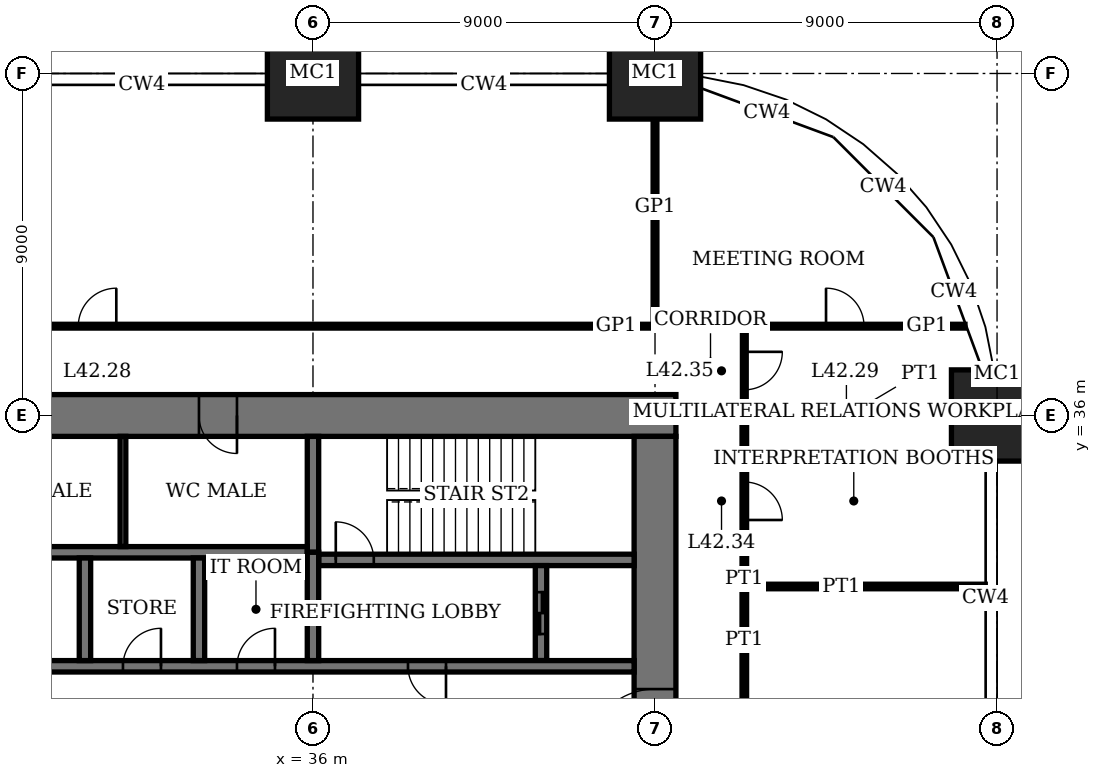
"""IFC4 building model, lengths in metres.
Left out: names, types, materials, properties, quantities, classifications, styles, units other than length and angle.
Written with IfcOpenShell. Run it as: python <this file> out.ifc"""

import sys

from ifc_helpers import new_model, si_unit, direction, frame, frame_2d, origin, origin_2d, place, context, subcontext, project, spatial, rectangle, extrude, element, fill, save


model = new_model("IFC4")
c1 = context("Model", 3, precision=1e-05, world=origin(), true_north=direction((0.0, 1.0)))
c2 = subcontext(c1, "Body", "Model", "MODEL_VIEW")
j1 = project(units=[si_unit("LENGTHUNIT", "METRE"), si_unit("PLANEANGLEUNIT", "RADIAN")], contexts=[c1])
p1 = place(None, origin())
s1 = spatial("IfcSite", under=j1, at=p1, CompositionType="ELEMENT")
p2 = place(p1, origin())
s2 = spatial("IfcBuilding", under=s1, at=p2, CompositionType="ELEMENT")
p3 = place(p2, frame((0.0, 0.0, 174.2)))
s3 = spatial("IfcBuildingStorey", under=s2, at=p3, CompositionType="ELEMENT", Elevation=174.2)
for number, where, z_axis, x_axis in (
    (1, (36.0, 45.0, 0.0), (0.0, 0.0, 1.0), (1.0, 0.0, 0.0)),
    (2, (45.0, 45.0, 0.0), (0.0, 0.0, 1.0), (1.0, 0.0, 0.0)),
    (3, (54.0, 36.0, 0.0), (0.0, 0.0, 1.0), (1.0, 0.0, 0.0)),
):
    element("IfcColumn", number, at=place(p3, frame(where, z_axis=z_axis, x_axis=x_axis)), inside=s3, PredefinedType="COLUMN", context=c2, shape_type="SweptSolid", body=[
        extrude(rectangle(XDim=2.4, YDim=2.4, at=origin_2d()), origin(), (0.0, 0.0, 1.0), 4.0),
    ])
p4 = place(p3, frame((45.55, 36.0, 0.0), z_axis=(0.0, 0.0, 1.0), x_axis=(-1.0, 0.0, 0.0)))
e4 = element("IfcWall", 4, at=p4, inside=s3, PredefinedType="SHEAR", context=c2, shape_type="SweptSolid", body=[
    extrude(rectangle(XDim=28.1, YDim=1.1, at=frame_2d((14.05, 0.0))), origin(), (0.0, 0.0, 1.0), 4.0),
])
p5 = place(p4, frame((11.55, 0.0, 0.0)))
e5 = element("IfcOpeningElement", 5, at=p5, cuts=e4, PredefinedType="OPENING", context=c2, shape_type="SweptSolid", body=[
    extrude(rectangle(XDim=1.0, YDim=2.4, at=frame_2d((0.5, 1.2))), frame((0.0, 0.56, 0.0), z_axis=(0.0, -1.0, 0.0), x_axis=(1.0, 0.0, 0.0)), (0.0, 0.0, 1.0), 1.12),
])
p6 = place(p4, frame((16.55, 0.0, 0.0)))
e6 = element("IfcOpeningElement", 6, at=p6, cuts=e4, PredefinedType="OPENING", context=c2, shape_type="SweptSolid", body=[
    extrude(rectangle(XDim=1.0, YDim=2.4, at=frame_2d((0.5, 1.2))), frame((0.0, 0.56, 0.0), z_axis=(0.0, -1.0, 0.0), x_axis=(1.0, 0.0, 0.0)), (0.0, 0.0, 1.0), 1.12),
])
p7 = place(p4, frame((20.0, 0.0, 0.0)))
e7 = element("IfcOpeningElement", 7, at=p7, cuts=e4, PredefinedType="OPENING", context=c2, shape_type="SweptSolid", body=[
    extrude(rectangle(XDim=1.1, YDim=2.4, at=frame_2d((0.55, 1.2))), frame((0.0, 0.56, 0.0), z_axis=(0.0, -1.0, 0.0), x_axis=(1.0, 0.0, 0.0)), (0.0, 0.0, 1.0), 1.12),
])
p8 = place(p4, frame((24.05, 0.0, 0.0)))
e8 = element("IfcOpeningElement", 8, at=p8, cuts=e4, PredefinedType="OPENING", context=c2, shape_type="SweptSolid", body=[
    extrude(rectangle(XDim=1.0, YDim=2.4, at=frame_2d((0.5, 1.2))), frame((0.0, 0.56, 0.0), z_axis=(0.0, -1.0, 0.0), x_axis=(1.0, 0.0, 0.0)), (0.0, 0.0, 1.0), 1.12),
])
p9 = place(p3, frame((45.0, 18.55, 0.0), z_axis=(0.0, 0.0, 1.0), x_axis=(0.0, 1.0, 0.0)))
e9 = element("IfcWall", 9, at=p9, inside=s3, PredefinedType="SHEAR", context=c2, shape_type="SweptSolid", body=[
    extrude(rectangle(XDim=16.9, YDim=1.1, at=frame_2d((8.45, 0.0))), origin(), (0.0, 0.0, 1.0), 4.0),
])
p10 = place(p9, frame((8.45, 0.0, 0.0)))
e10 = element("IfcOpeningElement", 10, at=p10, cuts=e9, PredefinedType="OPENING", context=c2, shape_type="SweptSolid", body=[
    extrude(rectangle(XDim=1.8, YDim=2.4, at=frame_2d((0.9, 1.2))), frame((0.0, 0.56, 0.0), z_axis=(0.0, -1.0, 0.0), x_axis=(1.0, 0.0, 0.0)), (0.0, 0.0, 1.0), 1.12),
])
p11 = place(p3, frame((36.15, 32.2, 0.0), z_axis=(0.0, 0.0, 1.0), x_axis=(1.0, 0.0, 0.0)))
e11 = element("IfcWall", 11, at=p11, inside=s3, PredefinedType="SHEAR", context=c2, shape_type="SweptSolid", body=[
    extrude(rectangle(XDim=8.3, YDim=0.3, at=frame_2d((4.15, 0.0))), origin(), (0.0, 0.0, 1.0), 4.0),
])
p12 = place(p11, frame((0.45, 0.0, 0.0)))
e12 = element("IfcOpeningElement", 12, at=p12, cuts=e11, PredefinedType="OPENING", context=c2, shape_type="SweptSolid", body=[
    extrude(rectangle(XDim=1.0, YDim=2.4, at=frame_2d((0.5, 1.2))), frame((0.0, 0.16, 0.0), z_axis=(0.0, -1.0, 0.0), x_axis=(1.0, 0.0, 0.0)), (0.0, 0.0, 1.0), 0.32),
])
p13 = place(p3, frame((36.0, 32.4, 0.0), z_axis=(0.0, 0.0, 1.0), x_axis=(0.0, 1.0, 0.0)))
e13 = element("IfcWall", 13, at=p13, inside=s3, PredefinedType="SHEAR", context=c2, shape_type="SweptSolid", body=[
    extrude(rectangle(XDim=3.05, YDim=0.3, at=frame_2d((1.525, 0.0))), origin(), (0.0, 0.0, 1.0), 4.0),
])
p14 = place(p3, frame((42.0, 29.55, 0.0), z_axis=(0.0, 0.0, 1.0), x_axis=(0.0, 1.0, 0.0)))
e14 = element("IfcWall", 14, at=p14, inside=s3, PredefinedType="SHEAR", context=c2, shape_type="SweptSolid", body=[
    extrude(rectangle(XDim=2.5, YDim=0.3, at=frame_2d((1.25, 0.0))), origin(), (0.0, 0.0, 1.0), 4.0),
])
p15 = place(p14, frame((0.7, 0.0, 0.0)))
e15 = element("IfcOpeningElement", 15, at=p15, cuts=e14, PredefinedType="OPENING", context=c2, shape_type="SweptSolid", body=[
    extrude(rectangle(XDim=1.1, YDim=2.4, at=frame_2d((0.55, 1.2))), frame((0.0, 0.16, 0.0), z_axis=(0.0, -1.0, 0.0), x_axis=(1.0, 0.0, 0.0)), (0.0, 0.0, 1.0), 0.32),
])
p16 = place(p3, frame((18.55, 29.4, 0.0), z_axis=(0.0, 0.0, 1.0), x_axis=(1.0, 0.0, 0.0)))
e16 = element("IfcWall", 16, at=p16, inside=s3, PredefinedType="SHEAR", context=c2, shape_type="SweptSolid", body=[
    extrude(rectangle(XDim=25.9, YDim=0.3, at=frame_2d((12.95, 0.0))), origin(), (0.0, 0.0, 1.0), 4.0),
])
p17 = place(p16, frame((19.95, 0.0, 0.0)))
e17 = element("IfcOpeningElement", 17, at=p17, cuts=e16, PredefinedType="OPENING", context=c2, shape_type="SweptSolid", body=[
    extrude(rectangle(XDim=1.0, YDim=2.4, at=frame_2d((0.5, 1.2))), frame((0.0, 0.16, 0.0), z_axis=(0.0, -1.0, 0.0), x_axis=(1.0, 0.0, 0.0)), (0.0, 0.0, 1.0), 0.32),
])
p18 = place(p16, frame((0.5, 0.0, 0.0)))
e18 = element("IfcOpeningElement", 18, at=p18, cuts=e16, PredefinedType="OPENING", context=c2, shape_type="SweptSolid", body=[
    extrude(rectangle(XDim=0.9, YDim=2.1, at=frame_2d((0.45, 1.05))), frame((0.0, 0.16, 0.0), z_axis=(0.0, -1.0, 0.0), x_axis=(1.0, 0.0, 0.0)), (0.0, 0.0, 1.0), 0.32),
])
p19 = place(p16, frame((15.45, 0.0, 0.0)))
e19 = element("IfcOpeningElement", 19, at=p19, cuts=e16, PredefinedType="OPENING", context=c2, shape_type="SweptSolid", body=[
    extrude(rectangle(XDim=1.0, YDim=2.4, at=frame_2d((0.5, 1.2))), frame((0.0, 0.16, 0.0), z_axis=(0.0, -1.0, 0.0), x_axis=(1.0, 0.0, 0.0)), (0.0, 0.0, 1.0), 0.32),
])
p20 = place(p16, frame((12.45, 0.0, 0.0)))
e20 = element("IfcOpeningElement", 20, at=p20, cuts=e16, PredefinedType="OPENING", context=c2, shape_type="SweptSolid", body=[
    extrude(rectangle(XDim=1.0, YDim=2.4, at=frame_2d((0.5, 1.2))), frame((0.0, 0.16, 0.0), z_axis=(0.0, -1.0, 0.0), x_axis=(1.0, 0.0, 0.0)), (0.0, 0.0, 1.0), 0.32),
])
p21 = place(p16, frame((9.4, 0.0, 0.0)))
e21 = element("IfcOpeningElement", 21, at=p21, cuts=e16, PredefinedType="OPENING", context=c2, shape_type="SweptSolid", body=[
    extrude(rectangle(XDim=1.1, YDim=2.4, at=frame_2d((0.55, 1.2))), frame((0.0, 0.16, 0.0), z_axis=(0.0, -1.0, 0.0), x_axis=(1.0, 0.0, 0.0)), (0.0, 0.0, 1.0), 0.32),
])
p22 = place(p16, frame((6.4, 0.0, 0.0)))
e22 = element("IfcOpeningElement", 22, at=p22, cuts=e16, PredefinedType="OPENING", context=c2, shape_type="SweptSolid", body=[
    extrude(rectangle(XDim=1.1, YDim=2.4, at=frame_2d((0.55, 1.2))), frame((0.0, 0.16, 0.0), z_axis=(0.0, -1.0, 0.0), x_axis=(1.0, 0.0, 0.0)), (0.0, 0.0, 1.0), 0.32),
])
p23 = place(p16, frame((3.3, 0.0, 0.0)))
e23 = element("IfcOpeningElement", 23, at=p23, cuts=e16, PredefinedType="OPENING", context=c2, shape_type="SweptSolid", body=[
    extrude(rectangle(XDim=1.3, YDim=2.4, at=frame_2d((0.65, 1.2))), frame((0.0, 0.16, 0.0), z_axis=(0.0, -1.0, 0.0), x_axis=(1.0, 0.0, 0.0)), (0.0, 0.0, 1.0), 0.32),
])
p24 = place(p3, frame((18.55, 32.4, 0.0), z_axis=(0.0, 0.0, 1.0), x_axis=(1.0, 0.0, 0.0)))
e24 = element("IfcWall", 24, at=p24, inside=s3, PredefinedType="SHEAR", context=c2, shape_type="SweptSolid", body=[
    extrude(rectangle(XDim=17.3, YDim=0.3, at=frame_2d((8.65, 0.0))), origin(), (0.0, 0.0, 1.0), 4.0),
])
for number, where, z_axis, x_axis in (
    (25, (33.0, 29.55, 0.0), (0.0, 0.0, 1.0), (0.0, 1.0, 0.0)),
    (26, (30.0, 29.55, 0.0), (0.0, 0.0, 1.0), (0.0, 1.0, 0.0)),
):
    element("IfcWall", number, at=place(p3, frame(where, z_axis=z_axis, x_axis=x_axis)), inside=s3, PredefinedType="SHEAR", context=c2, shape_type="SweptSolid", body=[
        extrude(rectangle(XDim=2.7, YDim=0.3, at=frame_2d((1.35, 0.0))), origin(), (0.0, 0.0, 1.0), 4.0),
    ])
p25 = place(p3, frame((36.0, 29.55, 0.0), z_axis=(0.0, 0.0, 1.0), x_axis=(0.0, 1.0, 0.0)))
e27 = element("IfcWall", 27, at=p25, inside=s3, PredefinedType="SHEAR", context=c2, shape_type="SweptSolid", body=[
    extrude(rectangle(XDim=2.85, YDim=0.3, at=frame_2d((1.425, 0.0))), origin(), (0.0, 0.0, 1.0), 4.0),
])
p26 = place(p3, frame((47.35, 31.5, 0.0), z_axis=(0.0, 0.0, 1.0), x_axis=(1.0, 0.0, 0.0)))
e28 = element("IfcWall", 28, at=p26, inside=s3, PredefinedType="PARTITIONING", context=c2, shape_type="SweptSolid", body=[
    extrude(rectangle(XDim=6.34, YDim=0.12, at=frame_2d((3.17, 0.0))), origin(), (0.0, 0.0, 1.0), 3.1),
])
p27 = place(p3, frame((47.35, 36.0, 0.0), z_axis=(0.0, 0.0, 1.0), x_axis=(1.0, 0.0, 0.0)))
e29 = element("IfcWall", 29, at=p27, inside=s3, PredefinedType="PARTITIONING", context=c2, shape_type="SweptSolid", body=[
    extrude(rectangle(XDim=5.45, YDim=0.12, at=frame_2d((2.725, 0.0))), origin(), (0.0, 0.0, 1.0), 3.05),
])
p28 = place(p3, frame((15.65, 38.35, 0.0), z_axis=(0.0, 0.0, 1.0), x_axis=(1.0, 0.0, 0.0)))
e30 = element("IfcWall", 30, at=p28, inside=s3, PredefinedType="PARTITIONING", context=c2, shape_type="SweptSolid", body=[
    extrude(rectangle(XDim=29.35, YDim=0.1, at=frame_2d((14.675, 0.0))), origin(), (0.0, 0.0, 1.0), 3.75),
])
p29 = place(p28, frame((14.175, 0.0, 0.0)))
e31 = element("IfcOpeningElement", 31, at=p29, cuts=e30, PredefinedType="OPENING", context=c2, shape_type="SweptSolid", body=[
    extrude(rectangle(XDim=1.0, YDim=2.4, at=frame_2d((0.5, 1.2))), frame((0.0, 0.06, 0.0), z_axis=(0.0, -1.0, 0.0), x_axis=(1.0, 0.0, 0.0)), (0.0, 0.0, 1.0), 0.12),
])
p30 = place(p3, frame((45.0, 38.35, 0.0), z_axis=(0.0, 0.0, 1.0), x_axis=(1.0, 0.0, 0.0)))
e32 = element("IfcWall", 32, at=p30, inside=s3, PredefinedType="PARTITIONING", context=c2, shape_type="SweptSolid", body=[
    extrude(rectangle(XDim=2.35, YDim=0.1, at=frame_2d((1.175, 0.0))), origin(), (0.0, 0.0, 1.0), 3.75),
])
p31 = place(p3, frame((47.35, 38.35, 0.0), z_axis=(0.0, 0.0, 1.0), x_axis=(1.0, 0.0, 0.0)))
e33 = element("IfcWall", 33, at=p31, inside=s3, PredefinedType="PARTITIONING", context=c2, shape_type="SweptSolid", body=[
    extrude(rectangle(XDim=5.806, YDim=0.1, at=frame_2d((2.903, 0.0))), origin(), (0.0, 0.0, 1.0), 3.75),
])
p32 = place(p31, frame((2.15, 0.0, 0.0)))
e34 = element("IfcOpeningElement", 34, at=p32, cuts=e33, PredefinedType="OPENING", context=c2, shape_type="SweptSolid", body=[
    extrude(rectangle(XDim=1.0, YDim=2.4, at=frame_2d((0.5, 1.2))), frame((0.0, 0.06, 0.0), z_axis=(0.0, -1.0, 0.0), x_axis=(1.0, 0.0, 0.0)), (0.0, 0.0, 1.0), 0.12),
])
p33 = place(p3, frame((45.0, 38.35, 0.0), z_axis=(0.0, 0.0, 1.0), x_axis=(0.0, 1.0, 0.0)))
e35 = element("IfcWall", 35, at=p33, inside=s3, PredefinedType="PARTITIONING", context=c2, shape_type="SweptSolid", body=[
    extrude(rectangle(XDim=5.45, YDim=0.1, at=frame_2d((2.725, 0.0))), origin(), (0.0, 0.0, 1.0), 3.05),
])
p34 = place(p3, frame((47.35, 22.5, 0.0), z_axis=(0.0, 0.0, 1.0), x_axis=(0.0, 1.0, 0.0)))
e36 = element("IfcWall", 36, at=p34, inside=s3, PredefinedType="PARTITIONING", context=c2, shape_type="SweptSolid", body=[
    extrude(rectangle(XDim=9.0, YDim=0.12, at=frame_2d((4.5, 0.0))), origin(), (0.0, 0.0, 1.0), 3.75),
])
p35 = place(p34, frame((4.0, 0.0, 0.0)))
e37 = element("IfcOpeningElement", 37, at=p35, cuts=e36, PredefinedType="OPENING", context=c2, shape_type="SweptSolid", body=[
    extrude(rectangle(XDim=1.0, YDim=2.4, at=frame_2d((0.5, 1.2))), frame((0.0, 0.07, 0.0), z_axis=(0.0, -1.0, 0.0), x_axis=(1.0, 0.0, 0.0)), (0.0, 0.0, 1.0), 0.14),
])
p36 = place(p3, frame((47.35, 31.5, 0.0), z_axis=(0.0, 0.0, 1.0), x_axis=(0.0, 1.0, 0.0)))
e38 = element("IfcWall", 38, at=p36, inside=s3, PredefinedType="PARTITIONING", context=c2, shape_type="SweptSolid", body=[
    extrude(rectangle(XDim=4.5, YDim=0.12, at=frame_2d((2.25, 0.0))), origin(), (0.0, 0.0, 1.0), 3.75),
])
p37 = place(p36, frame((1.75, 0.0, 0.0)))
e39 = element("IfcOpeningElement", 39, at=p37, cuts=e38, PredefinedType="OPENING", context=c2, shape_type="SweptSolid", body=[
    extrude(rectangle(XDim=1.0, YDim=2.4, at=frame_2d((0.5, 1.2))), frame((0.0, 0.07, 0.0), z_axis=(0.0, -1.0, 0.0), x_axis=(1.0, 0.0, 0.0)), (0.0, 0.0, 1.0), 0.14),
])
p38 = place(p3, frame((47.35, 36.0, 0.0), z_axis=(0.0, 0.0, 1.0), x_axis=(0.0, 1.0, 0.0)))
e40 = element("IfcWall", 40, at=p38, inside=s3, PredefinedType="PARTITIONING", context=c2, shape_type="SweptSolid", body=[
    extrude(rectangle(XDim=2.35, YDim=0.1, at=frame_2d((1.175, 0.0))), origin(), (0.0, 0.0, 1.0), 3.75),
])
p39 = place(p38, frame((0.675, 0.0, 0.0)))
e41 = element("IfcOpeningElement", 41, at=p39, cuts=e40, PredefinedType="OPENING", context=c2, shape_type="SweptSolid", body=[
    extrude(rectangle(XDim=1.0, YDim=2.4, at=frame_2d((0.5, 1.2))), frame((0.0, 0.06, 0.0), z_axis=(0.0, -1.0, 0.0), x_axis=(1.0, 0.0, 0.0)), (0.0, 0.0, 1.0), 0.12),
])
p40 = place(p3, frame((31.0, 32.55, 0.0), z_axis=(0.0, 0.0, 1.0), x_axis=(0.0, 1.0, 0.0)))
e42 = element("IfcWall", 42, at=p40, inside=s3, PredefinedType="PARTITIONING", context=c2, shape_type="SweptSolid", body=[
    extrude(rectangle(XDim=2.9, YDim=0.15, at=frame_2d((1.45, 0.0))), origin(), (0.0, 0.0, 1.0), 3.75),
])
p41 = place(p10, origin())
e43 = element("IfcDoor", 43, at=p41, inside=s3, OperationType="DOUBLE_DOOR_DOUBLE_SWING", PredefinedType="DOOR", context=c2, shape_type="SweptSolid", body=[
    extrude(rectangle(XDim=1.8, YDim=2.4, at=frame_2d((0.9, 1.2))), frame((0.0, 0.03, 0.0), z_axis=(0.0, -1.0, 0.0), x_axis=(1.0, 0.0, 0.0)), (0.0, 0.0, 1.0), 0.06),
    extrude(rectangle(XDim=0.04, YDim=2.4, at=frame_2d((0.02, 1.2))), frame((0.0, 0.55, 0.0), z_axis=(0.0, -1.0, 0.0), x_axis=(1.0, 0.0, 0.0)), (0.0, 0.0, 1.0), 1.1),
    extrude(rectangle(XDim=0.04, YDim=2.4, at=frame_2d((1.78, 1.2))), frame((0.0, 0.55, 0.0), z_axis=(0.0, -1.0, 0.0), x_axis=(1.0, 0.0, 0.0)), (0.0, 0.0, 1.0), 1.1),
    extrude(rectangle(XDim=1.8, YDim=0.04, at=frame_2d((0.9, 2.38))), frame((0.0, 0.55, 0.0), z_axis=(0.0, -1.0, 0.0), x_axis=(1.0, 0.0, 0.0)), (0.0, 0.0, 1.0), 1.1),
])
fill(e10, e43)
p42 = place(p5, origin())
e44 = element("IfcDoor", 44, at=p42, inside=s3, OperationType="SINGLE_SWING_RIGHT", PredefinedType="DOOR", context=c2, shape_type="SweptSolid", body=[
    extrude(rectangle(XDim=1.0, YDim=2.4, at=frame_2d((0.5, 1.2))), frame((0.0, 0.025, 0.0), z_axis=(0.0, -1.0, 0.0), x_axis=(1.0, 0.0, 0.0)), (0.0, 0.0, 1.0), 0.05),
    extrude(rectangle(XDim=0.04, YDim=2.4, at=frame_2d((0.02, 1.2))), frame((0.0, 0.4, 0.0), z_axis=(0.0, -1.0, 0.0), x_axis=(1.0, 0.0, 0.0)), (0.0, 0.0, 1.0), 0.8),
    extrude(rectangle(XDim=0.04, YDim=2.4, at=frame_2d((0.98, 1.2))), frame((0.0, 0.4, 0.0), z_axis=(0.0, -1.0, 0.0), x_axis=(1.0, 0.0, 0.0)), (0.0, 0.0, 1.0), 0.8),
    extrude(rectangle(XDim=1.0, YDim=0.04, at=frame_2d((0.5, 2.38))), frame((0.0, 0.4, 0.0), z_axis=(0.0, -1.0, 0.0), x_axis=(1.0, 0.0, 0.0)), (0.0, 0.0, 1.0), 0.8),
])
fill(e5, e44)
p43 = place(p12, origin())
e45 = element("IfcDoor", 45, at=p43, inside=s3, OperationType="SINGLE_SWING_RIGHT", PredefinedType="DOOR", context=c2, shape_type="SweptSolid", body=[
    extrude(rectangle(XDim=1.0, YDim=2.4, at=frame_2d((0.5, 1.2))), frame((0.0, 0.03, 0.0), z_axis=(0.0, -1.0, 0.0), x_axis=(1.0, 0.0, 0.0)), (0.0, 0.0, 1.0), 0.06),
])
fill(e12, e45)
p44 = place(p17, origin())
e46 = element("IfcDoor", 46, at=p44, inside=s3, OperationType="SINGLE_SWING_RIGHT", PredefinedType="DOOR", context=c2, shape_type="SweptSolid", body=[
    extrude(rectangle(XDim=1.0, YDim=2.4, at=frame_2d((0.5, 1.2))), frame((0.0, 0.03, 0.0), z_axis=(0.0, -1.0, 0.0), x_axis=(1.0, 0.0, 0.0)), (0.0, 0.0, 1.0), 0.06),
])
fill(e17, e46)
p45 = place(p29, origin())
e47 = element("IfcDoor", 47, at=p45, inside=s3, OperationType="SINGLE_SWING_LEFT", PredefinedType="DOOR", context=c2, shape_type="SweptSolid", body=[
    extrude(rectangle(XDim=1.0, YDim=2.4, at=frame_2d((0.5, 1.2))), frame((0.0, 0.02, 0.0), z_axis=(0.0, -1.0, 0.0), x_axis=(1.0, 0.0, 0.0)), (0.0, 0.0, 1.0), 0.04),
])
fill(e31, e47)
p46 = place(p32, origin())
e48 = element("IfcDoor", 48, at=p46, inside=s3, OperationType="SINGLE_SWING_RIGHT", PredefinedType="DOOR", context=c2, shape_type="SweptSolid", body=[
    extrude(rectangle(XDim=1.0, YDim=2.4, at=frame_2d((0.5, 1.2))), frame((0.0, 0.02, 0.0), z_axis=(0.0, -1.0, 0.0), x_axis=(1.0, 0.0, 0.0)), (0.0, 0.0, 1.0), 0.04),
])
fill(e34, e48)
p47 = place(p37, origin())
e49 = element("IfcDoor", 49, at=p47, inside=s3, OperationType="SINGLE_SWING_LEFT", PredefinedType="DOOR", context=c2, shape_type="SweptSolid", body=[
    extrude(rectangle(XDim=1.0, YDim=2.4, at=frame_2d((0.5, 1.2))), frame((0.0, 0.025, 0.0), z_axis=(0.0, -1.0, 0.0), x_axis=(1.0, 0.0, 0.0)), (0.0, 0.0, 1.0), 0.05),
])
fill(e39, e49)
p48 = place(p39, origin())
e50 = element("IfcDoor", 50, at=p48, inside=s3, OperationType="SINGLE_SWING_RIGHT", PredefinedType="DOOR", context=c2, shape_type="SweptSolid", body=[
    extrude(rectangle(XDim=1.0, YDim=2.4, at=frame_2d((0.5, 1.2))), frame((0.0, 0.02, 0.0), z_axis=(0.0, -1.0, 0.0), x_axis=(1.0, 0.0, 0.0)), (0.0, 0.0, 1.0), 0.04),
])
fill(e41, e50)
p49 = place(p19, origin())
e51 = element("IfcDoor", 51, at=p49, inside=s3, OperationType="SINGLE_SWING_LEFT", PredefinedType="DOOR", context=c2, shape_type="SweptSolid", body=[
    extrude(rectangle(XDim=1.0, YDim=2.4, at=frame_2d((0.5, 1.2))), frame((0.0, 0.03, 0.0), z_axis=(0.0, -1.0, 0.0), x_axis=(1.0, 0.0, 0.0)), (0.0, 0.0, 1.0), 0.06),
])
fill(e19, e51)
p50 = place(p20, origin())
e52 = element("IfcDoor", 52, at=p50, inside=s3, OperationType="SINGLE_SWING_LEFT", PredefinedType="DOOR", context=c2, shape_type="SweptSolid", body=[
    extrude(rectangle(XDim=1.0, YDim=2.4, at=frame_2d((0.5, 1.2))), frame((0.0, 0.03, 0.0), z_axis=(0.0, -1.0, 0.0), x_axis=(1.0, 0.0, 0.0)), (0.0, 0.0, 1.0), 0.06),
])
fill(e20, e52)
p51 = place(p15, origin())
e53 = element("IfcDoor", 53, at=p51, inside=s3, OperationType="DOUBLE_DOOR_SLIDING", PredefinedType="DOOR", context=c2, shape_type="SweptSolid", body=[
    extrude(rectangle(XDim=1.1, YDim=2.4, at=frame_2d((0.55, 1.2))), frame((0.0, 0.03, 0.0), z_axis=(0.0, -1.0, 0.0), x_axis=(1.0, 0.0, 0.0)), (0.0, 0.0, 1.0), 0.06),
])
fill(e15, e53)
save(model, sys.argv[1])
